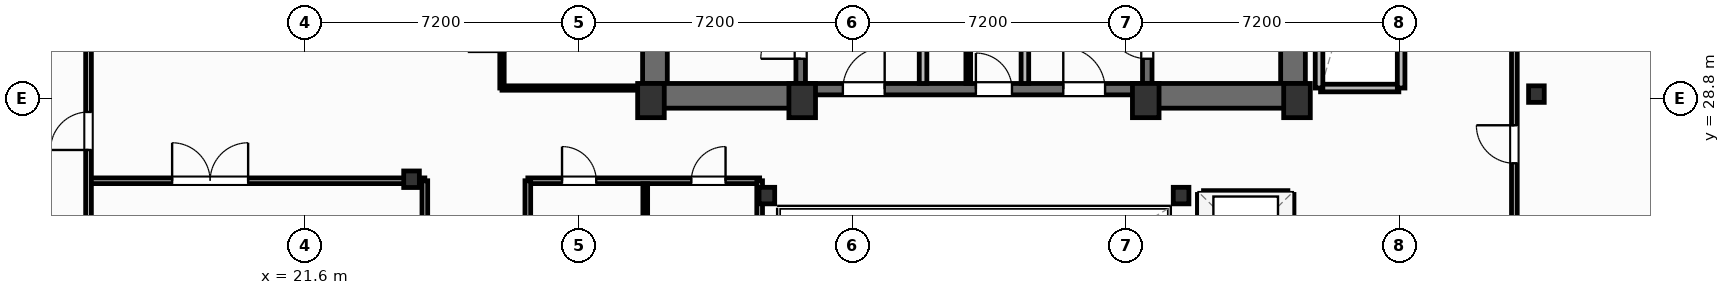
"""IFC4 building model, lengths in metres.
Left out: names, types, materials, properties, quantities, classifications, styles, units other than length and angle.
Written with IfcOpenShell. Run it as: python <this file> out.ifc"""

import sys

from ifc_helpers import new_model, si_unit, direction, frame, frame_2d, origin, origin_2d, place, context, subcontext, project, spatial, rectangle, i_section, extrude, element, fill, save


model = new_model("IFC4")
c1 = context("Model", 3, precision=1e-05, world=origin(), true_north=direction((0.0, 1.0)))
c2 = subcontext(c1, "Body", "Model", "MODEL_VIEW")
j1 = project(units=[si_unit("LENGTHUNIT", "METRE"), si_unit("PLANEANGLEUNIT", "RADIAN")], contexts=[c1])
p1 = place(None, origin())
s1 = spatial("IfcSite", under=j1, at=p1, CompositionType="ELEMENT")
p2 = place(p1, origin())
s2 = spatial("IfcBuilding", under=s1, at=p2, CompositionType="ELEMENT")
p3 = place(p2, frame((0.0, 0.0, 207.9)))
s3 = spatial("IfcBuildingStorey", under=s2, at=p3, CompositionType="ELEMENT", Elevation=207.9)
for number, where, z_axis, x_axis in (
    (1, (30.7, 28.75, 0.0), (0.0, 0.0, 1.0), (1.0, 0.0, 0.0)),
    (2, (34.68, 28.75, 0.0), (0.0, 0.0, 1.0), (1.0, 0.0, 0.0)),
    (3, (43.72, 28.75, 0.0), (0.0, 0.0, 1.0), (1.0, 0.0, 0.0)),
    (4, (47.7, 28.75, 0.0), (0.0, 0.0, 1.0), (1.0, 0.0, 0.0)),
):
    element("IfcColumn", number, at=place(p3, frame(where, z_axis=z_axis, x_axis=x_axis)), inside=s3, PredefinedType="COLUMN", context=c2, shape_type="SweptSolid", body=[
        extrude(rectangle(XDim=0.7, YDim=0.9, at=origin_2d()), origin(), (0.0, 0.0, 1.0), 4.8),
    ])
for number, where, z_axis, x_axis in (
    (5, (33.75, 26.25, 0.0), (0.0, 0.0, 1.0), (1.0, 0.0, 0.0)),
    (6, (44.65, 26.25, 0.0), (0.0, 0.0, 1.0), (1.0, 0.0, 0.0)),
    (7, (24.4, 26.68, 0.0), (0.0, 0.0, 1.0), (1.0, 0.0, 0.0)),
    (8, (54.0, 28.92, 0.0), (0.0, 0.0, 1.0), (1.0, 0.0, 0.0)),
):
    element("IfcColumn", number, at=place(p3, frame(where, z_axis=z_axis, x_axis=x_axis)), inside=s3, PredefinedType="COLUMN", context=c2, shape_type="SweptSolid", body=[
        extrude(i_section(OverallWidth=0.412, OverallDepth=0.435, WebThickness=0.036, FlangeThickness=0.057, FilletRadius=0.025, at=origin_2d()), origin(), (0.0, 0.0, 1.0), 4.8),
    ])
for number, where, z_axis, x_axis in (
    (9, (30.805, 29.2, 0.0), (0.0, 0.0, 1.0), (0.0, 1.0, 0.0)),
    (10, (47.595, 29.2, 0.0), (0.0, 0.0, 1.0), (0.0, 1.0, 0.0)),
):
    element("IfcWall", number, at=place(p3, frame(where, z_axis=z_axis, x_axis=x_axis)), inside=s3, PredefinedType="SHEAR", context=c2, shape_type="SweptSolid", body=[
        extrude(rectangle(XDim=9.22, YDim=0.65, at=frame_2d((4.61, 0.0))), origin(), (0.0, 0.0, 1.0), 4.55),
    ])
p4 = place(p3, frame((30.48, 28.875, 0.0), z_axis=(0.0, 0.0, 1.0), x_axis=(1.0, 0.0, 0.0)))
e11 = element("IfcWall", 11, at=p4, inside=s3, PredefinedType="SHEAR", context=c2, shape_type="SweptSolid", body=[
    extrude(rectangle(XDim=4.32, YDim=0.65, at=frame_2d((2.16, 0.0))), origin(), (0.0, 0.0, 1.0), 4.55),
])
p5 = place(p3, frame((43.6, 28.875, 0.0), z_axis=(0.0, 0.0, 1.0), x_axis=(1.0, 0.0, 0.0)))
e12 = element("IfcWall", 12, at=p5, inside=s3, PredefinedType="SHEAR", context=c2, shape_type="SweptSolid", body=[
    extrude(rectangle(XDim=4.32, YDim=0.65, at=frame_2d((2.16, 0.0))), origin(), (0.0, 0.0, 1.0), 4.55),
])
p6 = place(p3, frame((34.8, 29.05, 0.0), z_axis=(0.0, 0.0, 1.0), x_axis=(1.0, 0.0, 0.0)))
e13 = element("IfcWall", 13, at=p6, inside=s3, PredefinedType="SHEAR", context=c2, shape_type="SweptSolid", body=[
    extrude(rectangle(XDim=8.8, YDim=0.3, at=frame_2d((4.4, 0.0))), origin(), (0.0, 0.0, 1.0), 4.55),
])
p7 = place(p6, frame((0.95, 0.0, 0.0)))
e14 = element("IfcOpeningElement", 14, at=p7, cuts=e13, PredefinedType="OPENING", context=c2, shape_type="SweptSolid", body=[
    extrude(rectangle(XDim=1.1, YDim=2.15, at=frame_2d((0.55, 1.075))), frame((0.0, 0.16, 0.0), z_axis=(0.0, -1.0, 0.0), x_axis=(1.0, 0.0, 0.0)), (0.0, 0.0, 1.0), 0.32),
])
p8 = place(p6, frame((6.75, 0.0, 0.0)))
e15 = element("IfcOpeningElement", 15, at=p8, cuts=e13, PredefinedType="OPENING", context=c2, shape_type="SweptSolid", body=[
    extrude(rectangle(XDim=1.1, YDim=2.15, at=frame_2d((0.55, 1.075))), frame((0.0, 0.16, 0.0), z_axis=(0.0, -1.0, 0.0), x_axis=(1.0, 0.0, 0.0)), (0.0, 0.0, 1.0), 0.32),
])
p9 = place(p6, frame((4.45, 0.0, 0.0)))
e16 = element("IfcOpeningElement", 16, at=p9, cuts=e13, PredefinedType="OPENING", context=c2, shape_type="SweptSolid", body=[
    extrude(rectangle(XDim=0.95, YDim=2.15, at=frame_2d((0.475, 1.075))), frame((0.0, 0.16, 0.0), z_axis=(0.0, -1.0, 0.0), x_axis=(1.0, 0.0, 0.0)), (0.0, 0.0, 1.0), 0.32),
])
p10 = place(p3, frame((34.64, 29.2, 0.0), z_axis=(0.0, 0.0, 1.0), x_axis=(0.0, 1.0, 0.0)))
e17 = element("IfcWall", 17, at=p10, inside=s3, PredefinedType="SHEAR", context=c2, shape_type="SweptSolid", body=[
    extrude(rectangle(XDim=9.22, YDim=0.25, at=frame_2d((4.61, 0.0))), origin(), (0.0, 0.0, 1.0), 4.55),
])
p11 = place(p10, frame((0.65, 0.0, 0.0)))
e18 = element("IfcOpeningElement", 18, at=p11, cuts=e17, PredefinedType="OPENING", context=c2, shape_type="SweptSolid", body=[
    extrude(rectangle(XDim=1.05, YDim=2.15, at=frame_2d((0.525, 1.075))), frame((0.0, 0.135, 0.0), z_axis=(0.0, -1.0, 0.0), x_axis=(1.0, 0.0, 0.0)), (0.0, 0.0, 1.0), 0.27),
])
p12 = place(p3, frame((43.76, 29.2, 0.0), z_axis=(0.0, 0.0, 1.0), x_axis=(0.0, 1.0, 0.0)))
e19 = element("IfcWall", 19, at=p12, inside=s3, PredefinedType="SHEAR", context=c2, shape_type="SweptSolid", body=[
    extrude(rectangle(XDim=9.22, YDim=0.25, at=frame_2d((4.61, 0.0))), origin(), (0.0, 0.0, 1.0), 4.55),
])
p13 = place(p12, frame((0.65, 0.0, 0.0)))
e20 = element("IfcOpeningElement", 20, at=p13, cuts=e19, PredefinedType="OPENING", context=c2, shape_type="SweptSolid", body=[
    extrude(rectangle(XDim=1.05, YDim=2.15, at=frame_2d((0.525, 1.075))), frame((0.0, 0.135, 0.0), z_axis=(0.0, -1.0, 0.0), x_axis=(1.0, 0.0, 0.0)), (0.0, 0.0, 1.0), 0.27),
])
p14 = place(p3, frame((27.46, 26.64, 0.0), z_axis=(0.0, 0.0, 1.0), x_axis=(1.0, 0.0, 0.0)))
e21 = element("IfcWall", 21, at=p14, inside=s3, PredefinedType="PARTITIONING", context=c2, shape_type="SweptSolid", body=[
    extrude(rectangle(XDim=6.1, YDim=0.15, at=frame_2d((3.05, 0.0))), origin(), (0.0, 0.0, 1.0), 3.762),
])
p15 = place(p14, frame((0.9, 0.0, 0.0)))
e22 = element("IfcOpeningElement", 22, at=p15, cuts=e21, PredefinedType="OPENING", context=c2, shape_type="SweptSolid", body=[
    extrude(rectangle(XDim=0.9, YDim=2.05, at=frame_2d((0.45, 1.025))), frame((0.0, 0.085, 0.0), z_axis=(0.0, -1.0, 0.0), x_axis=(1.0, 0.0, 0.0)), (0.0, 0.0, 1.0), 0.17),
])
p16 = place(p14, frame((4.303, 0.0, 0.0)))
e23 = element("IfcOpeningElement", 23, at=p16, cuts=e21, PredefinedType="OPENING", context=c2, shape_type="SweptSolid", body=[
    extrude(rectangle(XDim=0.9, YDim=2.05, at=frame_2d((0.45, 1.025))), frame((0.0, 0.085, 0.0), z_axis=(0.0, -1.0, 0.0), x_axis=(1.0, 0.0, 0.0)), (0.0, 0.0, 1.0), 0.17),
])
p17 = place(p3, frame((30.55, 19.38, 0.0), z_axis=(0.0, 0.0, 1.0), x_axis=(0.0, 1.0, 0.0)))
e24 = element("IfcWall", 24, at=p17, inside=s3, PredefinedType="PARTITIONING", context=c2, shape_type="SweptSolid", body=[
    extrude(rectangle(XDim=7.18, YDim=0.125, at=frame_2d((3.59, 0.0))), origin(), (0.0, 0.0, 1.0), 4.55),
])
p18 = place(p3, frame((27.46, 19.3, 0.0), z_axis=(0.0, 0.0, 1.0), x_axis=(0.0, 1.0, 0.0)))
e25 = element("IfcWall", 25, at=p18, inside=s3, PredefinedType="PARTITIONING", context=c2, shape_type="SweptSolid", body=[
    extrude(rectangle(XDim=7.34, YDim=0.15, at=frame_2d((3.67, 0.0))), origin(), (0.0, 0.0, 1.0), 4.55),
])
p19 = place(p3, frame((33.56, 19.3, 0.0), z_axis=(0.0, 0.0, 1.0), x_axis=(0.0, 1.0, 0.0)))
e26 = element("IfcWall", 26, at=p19, inside=s3, PredefinedType="PARTITIONING", context=c2, shape_type="SweptSolid", body=[
    extrude(rectangle(XDim=7.34, YDim=0.15, at=frame_2d((3.67, 0.0))), origin(), (0.0, 0.0, 1.0), 3.924),
])
p20 = place(p3, frame((15.9, 26.64, 0.0), z_axis=(0.0, 0.0, 1.0), x_axis=(1.0, 0.0, 0.0)))
e27 = element("IfcWall", 27, at=p20, inside=s3, PredefinedType="PARTITIONING", context=c2, shape_type="SweptSolid", body=[
    extrude(rectangle(XDim=8.85, YDim=0.15, at=frame_2d((4.425, 0.0))), origin(), (0.0, 0.0, 1.0), 3.762),
])
p21 = place(p20, frame((2.2, 0.0, 0.0)))
e28 = element("IfcOpeningElement", 28, at=p21, cuts=e27, PredefinedType="OPENING", context=c2, shape_type="SweptSolid", body=[
    extrude(rectangle(XDim=2.0, YDim=2.05, at=frame_2d((1.0, 1.025))), frame((0.0, 0.085, 0.0), z_axis=(0.0, -1.0, 0.0), x_axis=(1.0, 0.0, 0.0)), (0.0, 0.0, 1.0), 0.17),
])
p22 = place(p3, frame((24.75, 19.3, 0.0), z_axis=(0.0, 0.0, 1.0), x_axis=(0.0, 1.0, 0.0)))
e29 = element("IfcWall", 29, at=p22, inside=s3, PredefinedType="PARTITIONING", context=c2, shape_type="SweptSolid", body=[
    extrude(rectangle(XDim=7.34, YDim=0.15, at=frame_2d((3.67, 0.0))), origin(), (0.0, 0.0, 1.0), 4.55),
])
p23 = place(p3, frame((15.9, 0.25, 0.0), z_axis=(0.0, 0.0, 1.0), x_axis=(0.0, 1.0, 0.0)))
e30 = element("IfcWall", 30, at=p23, inside=s3, PredefinedType="PARTITIONING", context=c2, shape_type="SweptSolid", body=[
    extrude(rectangle(XDim=35.754, YDim=0.15, at=frame_2d((17.877, 0.0))), origin(), (0.0, 0.0, 1.0), 4.55),
])
p24 = place(p23, frame((27.2, 0.0, 0.0)))
e31 = element("IfcOpeningElement", 31, at=p24, cuts=e30, PredefinedType="OPENING", context=c2, shape_type="SweptSolid", body=[
    extrude(rectangle(XDim=1.0, YDim=2.05, at=frame_2d((0.5, 1.025))), frame((0.0, 0.085, 0.0), z_axis=(0.0, -1.0, 0.0), x_axis=(1.0, 0.0, 0.0)), (0.0, 0.0, 1.0), 0.17),
])
p25 = place(p3, frame((53.42, 19.3, 0.0), z_axis=(0.0, 0.0, 1.0), x_axis=(0.0, 1.0, 0.0)))
e32 = element("IfcWall", 32, at=p25, inside=s3, PredefinedType="PARTITIONING", context=c2, shape_type="SweptSolid", body=[
    extrude(rectangle(XDim=20.02, YDim=0.15, at=frame_2d((10.01, 0.0))), origin(), (0.0, 0.0, 1.0), 4.55),
])
p26 = place(p25, frame((7.8, 0.0, 0.0)))
e33 = element("IfcOpeningElement", 33, at=p26, cuts=e32, PredefinedType="OPENING", context=c2, shape_type="SweptSolid", body=[
    extrude(rectangle(XDim=1.0, YDim=2.05, at=frame_2d((0.5, 1.025))), frame((0.0, 0.085, 0.0), z_axis=(0.0, -1.0, 0.0), x_axis=(1.0, 0.0, 0.0)), (0.0, 0.0, 1.0), 0.17),
])
for number, where, z_axis, x_axis in (
    (34, (37.86, 29.2, 0.0), (0.0, 0.0, 1.0), (0.0, 1.0, 0.0)),
    (35, (40.54, 29.2, 0.0), (0.0, 0.0, 1.0), (0.0, 1.0, 0.0)),
):
    element("IfcWall", number, at=place(p3, frame(where, z_axis=z_axis, x_axis=x_axis)), inside=s3, PredefinedType="PARTITIONING", context=c2, shape_type="SweptSolid", body=[
        extrude(rectangle(XDim=5.18, YDim=0.2, at=frame_2d((2.59, 0.0))), origin(), (0.0, 0.0, 1.0), 4.55),
    ])
p27 = place(p3, frame((39.05, 29.2, 0.0), z_axis=(0.0, 0.0, 1.0), x_axis=(0.0, 1.0, 0.0)))
e36 = element("IfcWall", 36, at=p27, inside=s3, PredefinedType="PARTITIONING", context=c2, shape_type="SweptSolid", body=[
    extrude(rectangle(XDim=5.22, YDim=0.125, at=frame_2d((2.61, 0.0))), origin(), (0.0, 0.0, 1.0), 4.55),
])
p28 = place(p27, frame((2.05, 0.0, 0.0)))
e37 = element("IfcOpeningElement", 37, at=p28, cuts=e36, PredefinedType="OPENING", context=c2, shape_type="SweptSolid", body=[
    extrude(rectangle(XDim=0.85, YDim=2.05, at=frame_2d((0.425, 1.025))), frame((0.0, 0.073, 0.0), z_axis=(0.0, -1.0, 0.0), x_axis=(1.0, 0.0, 0.0)), (0.0, 0.0, 1.0), 0.145),
])
p29 = place(p3, frame((26.78, 29.08, 0.0), z_axis=(0.0, 0.0, 1.0), x_axis=(1.0, 0.0, 0.0)))
e38 = element("IfcWall", 38, at=p29, inside=s3, PredefinedType="PARTITIONING", context=c2, shape_type="SweptSolid", body=[
    extrude(rectangle(XDim=3.7, YDim=0.115, at=frame_2d((1.85, 0.0))), origin(), (0.0, 0.0, 1.0), 4.55),
])
p30 = place(p3, frame((26.78, 29.08, 0.0), z_axis=(0.0, 0.0, 1.0), x_axis=(0.0, 1.0, 0.0)))
e39 = element("IfcWall", 39, at=p30, inside=s3, PredefinedType="PARTITIONING", context=c2, shape_type="SweptSolid", body=[
    extrude(rectangle(XDim=3.11, YDim=0.115, at=frame_2d((1.555, 0.0))), origin(), (0.0, 0.0, 1.0), 4.55),
])
p31 = place(p30, frame((0.95, 0.0, 0.0)))
e40 = element("IfcOpeningElement", 40, at=p31, cuts=e39, PredefinedType="OPENING", context=c2, shape_type="SweptSolid", body=[
    extrude(rectangle(XDim=0.9, YDim=2.05, at=frame_2d((0.45, 1.025))), frame((0.0, 0.067, 0.0), z_axis=(0.0, -1.0, 0.0), x_axis=(1.0, 0.0, 0.0)), (0.0, 0.0, 1.0), 0.135),
])
p32 = place(p3, frame((48.32, 29.08, 0.0), z_axis=(0.0, 0.0, 1.0), x_axis=(1.0, 0.0, 0.0)))
e41 = element("IfcWall", 41, at=p32, inside=s3, PredefinedType="PARTITIONING", context=c2, shape_type="SweptSolid", body=[
    extrude(rectangle(XDim=2.06, YDim=0.2, at=frame_2d((1.03, 0.0))), origin(), (0.0, 0.0, 1.0), 3.762),
])
for number, where, z_axis, x_axis in (
    (42, (48.28, 29.08, 0.0), (0.0, 0.0, 1.0), (0.0, 1.0, 0.0)),
    (43, (50.44, 29.08, 0.0), (0.0, 0.0, 1.0), (0.0, 1.0, 0.0)),
):
    element("IfcWall", number, at=place(p3, frame(where, z_axis=z_axis, x_axis=x_axis)), inside=s3, PredefinedType="PARTITIONING", context=c2, shape_type="SweptSolid", body=[
        extrude(rectangle(XDim=6.89, YDim=0.2, at=frame_2d((3.445, 0.0))), origin(), (0.0, 0.0, 1.0), 4.55),
    ])
p33 = place(p3, frame((45.24, 26.28, 0.0), z_axis=(0.0, 0.0, 1.0), x_axis=(1.0, 0.0, 0.0)))
e44 = element("IfcWall", 44, at=p33, inside=s3, PredefinedType="PARTITIONING", context=c2, shape_type="SweptSolid", body=[
    extrude(rectangle(XDim=2.22, YDim=0.2, at=frame_2d((1.11, 0.0))), origin(), (0.0, 0.0, 1.0), 4.55),
])
p34 = place(p3, frame((45.18, 19.38, 0.0), z_axis=(0.0, 0.0, 1.0), x_axis=(0.0, 1.0, 0.0)))
e45 = element("IfcWall", 45, at=p34, inside=s3, PredefinedType="PARTITIONING", context=c2, shape_type="SweptSolid", body=[
    extrude(rectangle(XDim=6.9, YDim=0.2, at=frame_2d((3.45, 0.0))), origin(), (0.0, 0.0, 1.0), 4.55),
])
p35 = place(p3, frame((47.52, 19.38, 0.0), z_axis=(0.0, 0.0, 1.0), x_axis=(0.0, 1.0, 0.0)))
e46 = element("IfcWall", 46, at=p35, inside=s3, PredefinedType="PARTITIONING", context=c2, shape_type="SweptSolid", body=[
    extrude(rectangle(XDim=6.9, YDim=0.2, at=frame_2d((3.45, 0.0))), origin(), (0.0, 0.0, 1.0), 4.55),
])
p36 = place(p35, frame((0.59, 0.0, 0.0)))
e47 = element("IfcOpeningElement", 47, at=p36, cuts=e46, PredefinedType="OPENING", context=c2, shape_type="SweptSolid", body=[
    extrude(rectangle(XDim=1.1, YDim=2.15, at=frame_2d((0.55, 1.075))), frame((0.0, 0.11, 0.0), z_axis=(0.0, -1.0, 0.0), x_axis=(1.0, 0.0, 0.0)), (0.0, 0.0, 1.0), 0.22),
])
p37 = place(p35, frame((2.89, 0.0, 0.0)))
e48 = element("IfcOpeningElement", 48, at=p37, cuts=e46, PredefinedType="OPENING", context=c2, shape_type="SweptSolid", body=[
    extrude(rectangle(XDim=1.1, YDim=2.15, at=frame_2d((0.55, 1.075))), frame((0.0, 0.11, 0.0), z_axis=(0.0, -1.0, 0.0), x_axis=(1.0, 0.0, 0.0)), (0.0, 0.0, 1.0), 0.22),
])
p38 = place(p35, frame((5.19, 0.0, 0.0)))
e49 = element("IfcOpeningElement", 49, at=p38, cuts=e46, PredefinedType="OPENING", context=c2, shape_type="SweptSolid", body=[
    extrude(rectangle(XDim=1.1, YDim=2.15, at=frame_2d((0.55, 1.075))), frame((0.0, 0.11, 0.0), z_axis=(0.0, -1.0, 0.0), x_axis=(1.0, 0.0, 0.0)), (0.0, 0.0, 1.0), 0.22),
])
p39 = place(p15, origin())
e50 = element("IfcDoor", 50, at=p39, inside=s3, OperationType="SINGLE_SWING_LEFT", PredefinedType="DOOR", context=c2, shape_type="SweptSolid", body=[
    extrude(rectangle(XDim=0.9, YDim=2.05, at=frame_2d((0.45, 1.025))), frame((0.0, 0.025, 0.0), z_axis=(0.0, -1.0, 0.0), x_axis=(1.0, 0.0, 0.0)), (0.0, 0.0, 1.0), 0.05),
])
fill(e22, e50)
p40 = place(p16, origin())
e51 = element("IfcDoor", 51, at=p40, inside=s3, OperationType="SINGLE_SWING_RIGHT", PredefinedType="DOOR", context=c2, shape_type="SweptSolid", body=[
    extrude(rectangle(XDim=0.9, YDim=2.05, at=frame_2d((0.45, 1.025))), frame((0.0, 0.025, 0.0), z_axis=(0.0, -1.0, 0.0), x_axis=(1.0, 0.0, 0.0)), (0.0, 0.0, 1.0), 0.05),
])
fill(e23, e51)
p41 = place(p21, origin())
e52 = element("IfcDoor", 52, at=p41, inside=s3, OperationType="DOUBLE_DOOR_SINGLE_SWING", PredefinedType="DOOR", context=c2, shape_type="SweptSolid", body=[
    extrude(rectangle(XDim=2.0, YDim=2.05, at=frame_2d((1.0, 1.025))), frame((0.0, 0.025, 0.0), z_axis=(0.0, -1.0, 0.0), x_axis=(1.0, 0.0, 0.0)), (0.0, 0.0, 1.0), 0.05),
])
fill(e28, e52)
p42 = place(p24, origin())
e53 = element("IfcDoor", 53, at=p42, inside=s3, OperationType="SINGLE_SWING_LEFT", PredefinedType="DOOR", context=c2, shape_type="SweptSolid", body=[
    extrude(rectangle(XDim=1.0, YDim=2.05, at=frame_2d((0.5, 1.025))), frame((0.0, 0.025, 0.0), z_axis=(0.0, -1.0, 0.0), x_axis=(1.0, 0.0, 0.0)), (0.0, 0.0, 1.0), 0.05),
])
fill(e31, e53)
p43 = place(p26, origin())
e54 = element("IfcDoor", 54, at=p43, inside=s3, OperationType="SINGLE_SWING_RIGHT", PredefinedType="DOOR", context=c2, shape_type="SweptSolid", body=[
    extrude(rectangle(XDim=1.0, YDim=2.05, at=frame_2d((0.5, 1.025))), frame((0.0, 0.025, 0.0), z_axis=(0.0, -1.0, 0.0), x_axis=(1.0, 0.0, 0.0)), (0.0, 0.0, 1.0), 0.05),
])
fill(e33, e54)
p44 = place(p11, origin())
e55 = element("IfcDoor", 55, at=p44, inside=s3, OperationType="SINGLE_SWING_LEFT", PredefinedType="DOOR", context=c2, shape_type="SweptSolid", body=[
    extrude(rectangle(XDim=1.05, YDim=2.15, at=frame_2d((0.525, 1.075))), frame((0.0, 0.025, 0.0), z_axis=(0.0, -1.0, 0.0), x_axis=(1.0, 0.0, 0.0)), (0.0, 0.0, 1.0), 0.05),
])
fill(e18, e55)
p45 = place(p13, origin())
e56 = element("IfcDoor", 56, at=p45, inside=s3, OperationType="SINGLE_SWING_RIGHT", PredefinedType="DOOR", context=c2, shape_type="SweptSolid", body=[
    extrude(rectangle(XDim=1.05, YDim=2.15, at=frame_2d((0.525, 1.075))), frame((0.0, 0.025, 0.0), z_axis=(0.0, -1.0, 0.0), x_axis=(1.0, 0.0, 0.0)), (0.0, 0.0, 1.0), 0.05),
])
fill(e20, e56)
p46 = place(p7, origin())
e57 = element("IfcDoor", 57, at=p46, inside=s3, OperationType="SINGLE_SWING_RIGHT", PredefinedType="DOOR", context=c2, shape_type="SweptSolid", body=[
    extrude(rectangle(XDim=1.1, YDim=2.15, at=frame_2d((0.55, 1.075))), frame((0.0, 0.025, 0.0), z_axis=(0.0, -1.0, 0.0), x_axis=(1.0, 0.0, 0.0)), (0.0, 0.0, 1.0), 0.05),
])
fill(e14, e57)
p47 = place(p8, origin())
e58 = element("IfcDoor", 58, at=p47, inside=s3, OperationType="SINGLE_SWING_LEFT", PredefinedType="DOOR", context=c2, shape_type="SweptSolid", body=[
    extrude(rectangle(XDim=1.1, YDim=2.15, at=frame_2d((0.55, 1.075))), frame((0.0, 0.025, 0.0), z_axis=(0.0, -1.0, 0.0), x_axis=(1.0, 0.0, 0.0)), (0.0, 0.0, 1.0), 0.05),
])
fill(e15, e58)
p48 = place(p9, origin())
e59 = element("IfcDoor", 59, at=p48, inside=s3, OperationType="SINGLE_SWING_LEFT", PredefinedType="DOOR", context=c2, shape_type="SweptSolid", body=[
    extrude(rectangle(XDim=0.95, YDim=2.15, at=frame_2d((0.475, 1.075))), frame((0.0, 0.025, 0.0), z_axis=(0.0, -1.0, 0.0), x_axis=(1.0, 0.0, 0.0)), (0.0, 0.0, 1.0), 0.05),
])
fill(e16, e59)
save(model, sys.argv[1])
